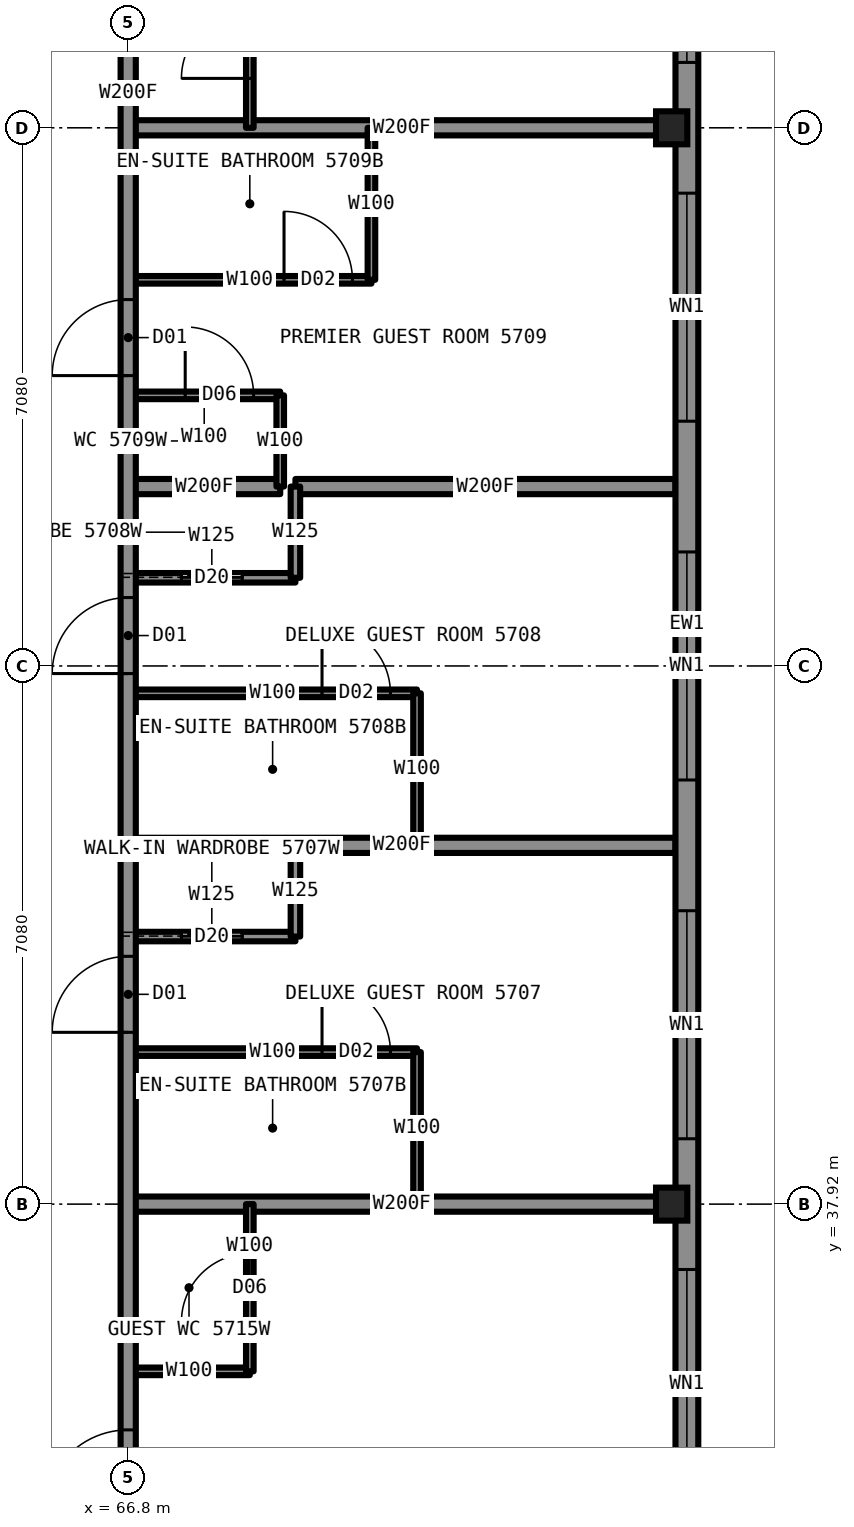
"""IFC4 building model, lengths in metres.
Left out: names, types, materials, properties, quantities, classifications, styles, units other than length and angle.
Written with IfcOpenShell. Run it as: python <this file> out.ifc"""

import sys

from ifc_helpers import new_model, si_unit, direction, frame, frame_2d, origin, origin_2d, place, context, subcontext, project, spatial, rectangle, i_section, extrude, element, fill, save


model = new_model("IFC4")
c1 = context("Model", 3, precision=1e-05, world=origin(), true_north=direction((0.0, 1.0)))
c2 = subcontext(c1, "Body", "Model", "MODEL_VIEW")
j1 = project(units=[si_unit("LENGTHUNIT", "METRE"), si_unit("PLANEANGLEUNIT", "RADIAN")], contexts=[c1])
p1 = place(None, origin())
s1 = spatial("IfcSite", under=j1, at=p1, CompositionType="ELEMENT")
p2 = place(p1, origin())
s2 = spatial("IfcBuilding", under=s1, at=p2, CompositionType="ELEMENT")
p3 = place(p2, frame((0.0, 0.0, 203.8)))
s3 = spatial("IfcBuildingStorey", under=s2, at=p3, CompositionType="ELEMENT", Elevation=203.8)
for number, where, z_axis, x_axis in (
    (1, (73.95, 37.92, 0.0), (0.0, 0.0, 1.0), (1.0, 0.0, 0.0)),
    (2, (73.95, 52.08, 0.0), (0.0, 0.0, 1.0), (1.0, 0.0, 0.0)),
):
    element("IfcColumn", number, at=place(p3, frame(where, z_axis=z_axis, x_axis=x_axis)), inside=s3, PredefinedType="COLUMN", context=c2, shape_type="SweptSolid", body=[
        extrude(i_section(OverallWidth=0.411, OverallDepth=0.434, WebThickness=0.036, FlangeThickness=0.057, at=origin_2d()), origin(), (0.0, 0.0, 1.0), 3.5),
    ])
p4 = place(p3, frame((66.8, 44.64, 0.0), z_axis=(0.0, 0.0, 1.0), x_axis=(1.0, 0.0, 0.0)))
e3 = element("IfcWall", 3, at=p4, inside=s3, PredefinedType="PARTITIONING", context=c2, shape_type="SweptSolid", body=[
    extrude(rectangle(XDim=3.8, YDim=0.1, at=frame_2d((1.9, 0.0))), origin(), (0.0, 0.0, 1.0), 3.33),
])
p5 = place(p4, frame((2.55, 0.0, 0.0)))
e4 = element("IfcOpeningElement", 4, at=p5, cuts=e3, PredefinedType="OPENING", context=c2, shape_type="SweptSolid", body=[
    extrude(rectangle(XDim=0.9, YDim=2.1, at=frame_2d((0.45, 1.05))), frame((0.0, 0.06, 0.0), z_axis=(0.0, -1.0, 0.0), x_axis=(1.0, 0.0, 0.0)), (0.0, 0.0, 1.0), 0.12),
])
p6 = place(p3, frame((66.8, 42.64, 0.0), z_axis=(0.0, 0.0, 1.0), x_axis=(1.0, 0.0, 0.0)))
e5 = element("IfcWall", 5, at=p6, inside=s3, PredefinedType="PARTITIONING", context=c2, shape_type="SweptSolid", body=[
    extrude(rectangle(XDim=7.2, YDim=0.2, at=frame_2d((3.6, 0.0))), origin(), (0.0, 0.0, 1.0), 2.73),
])
p7 = place(p3, frame((66.8, 41.44, 0.0), z_axis=(0.0, 0.0, 1.0), x_axis=(1.0, 0.0, 0.0)))
e6 = element("IfcWall", 6, at=p7, inside=s3, PredefinedType="PARTITIONING", context=c2, shape_type="SweptSolid", body=[
    extrude(rectangle(XDim=2.2, YDim=0.125, at=frame_2d((1.1, 0.0))), origin(), (0.0, 0.0, 1.0), 3.33),
])
p8 = place(p7, frame((0.7, 0.0, 0.0)))
e7 = element("IfcOpeningElement", 7, at=p8, cuts=e6, PredefinedType="OPENING", context=c2, shape_type="SweptSolid", body=[
    extrude(rectangle(XDim=0.8, YDim=2.1, at=frame_2d((0.4, 1.05))), frame((0.0, 0.073, 0.0), z_axis=(0.0, -1.0, 0.0), x_axis=(1.0, 0.0, 0.0)), (0.0, 0.0, 1.0), 0.145),
])
p9 = place(p3, frame((66.8, 39.92, 0.0), z_axis=(0.0, 0.0, 1.0), x_axis=(1.0, 0.0, 0.0)))
e8 = element("IfcWall", 8, at=p9, inside=s3, PredefinedType="PARTITIONING", context=c2, shape_type="SweptSolid", body=[
    extrude(rectangle(XDim=3.8, YDim=0.1, at=frame_2d((1.9, 0.0))), origin(), (0.0, 0.0, 1.0), 3.33),
])
p10 = place(p9, frame((2.55, 0.0, 0.0)))
e9 = element("IfcOpeningElement", 9, at=p10, cuts=e8, PredefinedType="OPENING", context=c2, shape_type="SweptSolid", body=[
    extrude(rectangle(XDim=0.9, YDim=2.1, at=frame_2d((0.45, 1.05))), frame((0.0, 0.06, 0.0), z_axis=(0.0, -1.0, 0.0), x_axis=(1.0, 0.0, 0.0)), (0.0, 0.0, 1.0), 0.12),
])
p11 = place(p3, frame((66.8, 37.92, 0.0), z_axis=(0.0, 0.0, 1.0), x_axis=(1.0, 0.0, 0.0)))
e10 = element("IfcWall", 10, at=p11, inside=s3, PredefinedType="PARTITIONING", context=c2, shape_type="SweptSolid", body=[
    extrude(rectangle(XDim=7.2, YDim=0.2, at=frame_2d((3.6, 0.0))), origin(), (0.0, 0.0, 1.0), 2.573),
])
p12 = place(p3, frame((66.8, 35.72, 0.0), z_axis=(0.0, 0.0, 1.0), x_axis=(1.0, 0.0, 0.0)))
e11 = element("IfcWall", 11, at=p12, inside=s3, PredefinedType="PARTITIONING", context=c2, shape_type="SweptSolid", body=[
    extrude(rectangle(XDim=1.6, YDim=0.1, at=frame_2d((0.8, 0.0))), origin(), (0.0, 0.0, 1.0), 3.33),
])
p13 = place(p3, frame((66.8, 46.16, 0.0), z_axis=(0.0, 0.0, 1.0), x_axis=(1.0, 0.0, 0.0)))
e12 = element("IfcWall", 12, at=p13, inside=s3, PredefinedType="PARTITIONING", context=c2, shape_type="SweptSolid", body=[
    extrude(rectangle(XDim=2.2, YDim=0.125, at=frame_2d((1.1, 0.0))), origin(), (0.0, 0.0, 1.0), 3.33),
])
p14 = place(p13, frame((0.7, 0.0, 0.0)))
e13 = element("IfcOpeningElement", 13, at=p14, cuts=e12, PredefinedType="OPENING", context=c2, shape_type="SweptSolid", body=[
    extrude(rectangle(XDim=0.8, YDim=2.1, at=frame_2d((0.4, 1.05))), frame((0.0, 0.073, 0.0), z_axis=(0.0, -1.0, 0.0), x_axis=(1.0, 0.0, 0.0)), (0.0, 0.0, 1.0), 0.145),
])
p15 = place(p3, frame((66.8, 47.36, 0.0), z_axis=(0.0, 0.0, 1.0), x_axis=(1.0, 0.0, 0.0)))
e14 = element("IfcWall", 14, at=p15, inside=s3, PredefinedType="PARTITIONING", context=c2, shape_type="SweptSolid", body=[
    extrude(rectangle(XDim=2.0, YDim=0.2, at=frame_2d((1.0, 0.0))), origin(), (0.0, 0.0, 1.0), 2.73),
])
p16 = place(p3, frame((69.0, 47.36, 0.0), z_axis=(0.0, 0.0, 1.0), x_axis=(1.0, 0.0, 0.0)))
e15 = element("IfcWall", 15, at=p16, inside=s3, PredefinedType="PARTITIONING", context=c2, shape_type="SweptSolid", body=[
    extrude(rectangle(XDim=5.0, YDim=0.2, at=frame_2d((2.5, 0.0))), origin(), (0.0, 0.0, 1.0), 2.73),
])
p17 = place(p3, frame((66.8, 48.56, 0.0), z_axis=(0.0, 0.0, 1.0), x_axis=(1.0, 0.0, 0.0)))
e16 = element("IfcWall", 16, at=p17, inside=s3, PredefinedType="PARTITIONING", context=c2, shape_type="SweptSolid", body=[
    extrude(rectangle(XDim=2.0, YDim=0.1, at=frame_2d((1.0, 0.0))), origin(), (0.0, 0.0, 1.0), 3.33),
])
p18 = place(p17, frame((0.75, 0.0, 0.0)))
e17 = element("IfcOpeningElement", 17, at=p18, cuts=e16, PredefinedType="OPENING", context=c2, shape_type="SweptSolid", body=[
    extrude(rectangle(XDim=0.9, YDim=2.1, at=frame_2d((0.45, 1.05))), frame((0.0, 0.06, 0.0), z_axis=(0.0, -1.0, 0.0), x_axis=(1.0, 0.0, 0.0)), (0.0, 0.0, 1.0), 0.12),
])
p19 = place(p3, frame((66.8, 50.08, 0.0), z_axis=(0.0, 0.0, 1.0), x_axis=(1.0, 0.0, 0.0)))
e18 = element("IfcWall", 18, at=p19, inside=s3, PredefinedType="PARTITIONING", context=c2, shape_type="SweptSolid", body=[
    extrude(rectangle(XDim=3.2, YDim=0.1, at=frame_2d((1.6, 0.0))), origin(), (0.0, 0.0, 1.0), 3.33),
])
p20 = place(p19, frame((2.05, 0.0, 0.0)))
e19 = element("IfcOpeningElement", 19, at=p20, cuts=e18, PredefinedType="OPENING", context=c2, shape_type="SweptSolid", body=[
    extrude(rectangle(XDim=0.9, YDim=2.1, at=frame_2d((0.45, 1.05))), frame((0.0, 0.06, 0.0), z_axis=(0.0, -1.0, 0.0), x_axis=(1.0, 0.0, 0.0)), (0.0, 0.0, 1.0), 0.12),
])
p21 = place(p3, frame((66.8, 52.08, 0.0), z_axis=(0.0, 0.0, 1.0), x_axis=(1.0, 0.0, 0.0)))
e20 = element("IfcWall", 20, at=p21, inside=s3, PredefinedType="PARTITIONING", context=c2, shape_type="SweptSolid", body=[
    extrude(rectangle(XDim=7.2, YDim=0.2, at=frame_2d((3.6, 0.0))), origin(), (0.0, 0.0, 1.0), 2.573),
])
p22 = place(p3, frame((66.8, 33.2, 0.0), z_axis=(0.0, 0.0, 1.0), x_axis=(0.0, 1.0, 0.0)))
e21 = element("IfcWall", 21, at=p22, inside=s3, PredefinedType="PARTITIONING", context=c2, shape_type="SweptSolid", body=[
    extrude(rectangle(XDim=23.58, YDim=0.2, at=frame_2d((11.79, 0.0))), origin(), (0.0, 0.0, 1.0), 3.33),
])
p23 = place(p22, frame((6.98, 0.0, 0.0)))
e22 = element("IfcOpeningElement", 22, at=p23, cuts=e21, PredefinedType="OPENING", context=c2, shape_type="SweptSolid", body=[
    extrude(rectangle(XDim=1.0, YDim=2.2, at=frame_2d((0.5, 1.1))), frame((0.0, 0.11, 0.0), z_axis=(0.0, -1.0, 0.0), x_axis=(1.0, 0.0, 0.0)), (0.0, 0.0, 1.0), 0.22),
])
p24 = place(p22, frame((11.7, 0.0, 0.0)))
e23 = element("IfcOpeningElement", 23, at=p24, cuts=e21, PredefinedType="OPENING", context=c2, shape_type="SweptSolid", body=[
    extrude(rectangle(XDim=1.0, YDim=2.2, at=frame_2d((0.5, 1.1))), frame((0.0, 0.11, 0.0), z_axis=(0.0, -1.0, 0.0), x_axis=(1.0, 0.0, 0.0)), (0.0, 0.0, 1.0), 0.22),
])
p25 = place(p22, frame((15.62, 0.0, 0.0)))
e24 = element("IfcOpeningElement", 24, at=p25, cuts=e21, PredefinedType="OPENING", context=c2, shape_type="SweptSolid", body=[
    extrude(rectangle(XDim=1.0, YDim=2.2, at=frame_2d((0.5, 1.1))), frame((0.0, 0.11, 0.0), z_axis=(0.0, -1.0, 0.0), x_axis=(1.0, 0.0, 0.0)), (0.0, 0.0, 1.0), 0.22),
])
p26 = place(p22, frame((22.05, 0.0, 0.0)))
e25 = element("IfcOpeningElement", 25, at=p26, cuts=e21, PredefinedType="OPENING", context=c2, shape_type="SweptSolid", body=[
    extrude(rectangle(XDim=1.1, YDim=2.2, at=frame_2d((0.55, 1.1))), frame((0.0, 0.11, 0.0), z_axis=(0.0, -1.0, 0.0), x_axis=(1.0, 0.0, 0.0)), (0.0, 0.0, 1.0), 0.22),
])
p27 = place(p22, frame((0.65, 0.0, 0.0)))
e26 = element("IfcOpeningElement", 26, at=p27, cuts=e21, PredefinedType="OPENING", context=c2, shape_type="SweptSolid", body=[
    extrude(rectangle(XDim=1.1, YDim=2.2, at=frame_2d((0.55, 1.1))), frame((0.0, 0.11, 0.0), z_axis=(0.0, -1.0, 0.0), x_axis=(1.0, 0.0, 0.0)), (0.0, 0.0, 1.0), 0.22),
])
p28 = place(p3, frame((68.4, 35.72, 0.0), z_axis=(0.0, 0.0, 1.0), x_axis=(0.0, 1.0, 0.0)))
e27 = element("IfcWall", 27, at=p28, inside=s3, PredefinedType="PARTITIONING", context=c2, shape_type="SweptSolid", body=[
    extrude(rectangle(XDim=2.2, YDim=0.1, at=frame_2d((1.1, 0.0))), origin(), (0.0, 0.0, 1.0), 3.33),
])
p29 = place(p28, frame((0.65, 0.0, 0.0)))
e28 = element("IfcOpeningElement", 28, at=p29, cuts=e27, PredefinedType="OPENING", context=c2, shape_type="SweptSolid", body=[
    extrude(rectangle(XDim=0.9, YDim=2.1, at=frame_2d((0.45, 1.05))), frame((0.0, 0.06, 0.0), z_axis=(0.0, -1.0, 0.0), x_axis=(1.0, 0.0, 0.0)), (0.0, 0.0, 1.0), 0.12),
])
p30 = place(p3, frame((68.4, 52.08, 0.0), z_axis=(0.0, 0.0, 1.0), x_axis=(0.0, 1.0, 0.0)))
e29 = element("IfcWall", 29, at=p30, inside=s3, PredefinedType="PARTITIONING", context=c2, shape_type="SweptSolid", body=[
    extrude(rectangle(XDim=2.2, YDim=0.1, at=frame_2d((1.1, 0.0))), origin(), (0.0, 0.0, 1.0), 3.33),
])
p31 = place(p30, frame((0.65, 0.0, 0.0)))
e30 = element("IfcOpeningElement", 30, at=p31, cuts=e29, PredefinedType="OPENING", context=c2, shape_type="SweptSolid", body=[
    extrude(rectangle(XDim=0.9, YDim=2.1, at=frame_2d((0.45, 1.05))), frame((0.0, 0.06, 0.0), z_axis=(0.0, -1.0, 0.0), x_axis=(1.0, 0.0, 0.0)), (0.0, 0.0, 1.0), 0.12),
])
p32 = place(p3, frame((68.8, 47.36, 0.0), z_axis=(0.0, 0.0, 1.0), x_axis=(0.0, 1.0, 0.0)))
e31 = element("IfcWall", 31, at=p32, inside=s3, PredefinedType="PARTITIONING", context=c2, shape_type="SweptSolid", body=[
    extrude(rectangle(XDim=1.2, YDim=0.1, at=frame_2d((0.6, 0.0))), origin(), (0.0, 0.0, 1.0), 3.33),
])
p33 = place(p3, frame((69.0, 41.44, 0.0), z_axis=(0.0, 0.0, 1.0), x_axis=(0.0, 1.0, 0.0)))
e32 = element("IfcWall", 32, at=p33, inside=s3, PredefinedType="PARTITIONING", context=c2, shape_type="SweptSolid", body=[
    extrude(rectangle(XDim=1.2, YDim=0.125, at=frame_2d((0.6, 0.0))), origin(), (0.0, 0.0, 1.0), 3.33),
])
p34 = place(p3, frame((69.0, 46.16, 0.0), z_axis=(0.0, 0.0, 1.0), x_axis=(0.0, 1.0, 0.0)))
e33 = element("IfcWall", 33, at=p34, inside=s3, PredefinedType="PARTITIONING", context=c2, shape_type="SweptSolid", body=[
    extrude(rectangle(XDim=1.2, YDim=0.125, at=frame_2d((0.6, 0.0))), origin(), (0.0, 0.0, 1.0), 3.33),
])
for number, where, z_axis, x_axis in (
    (34, (70.0, 50.08, 0.0), (0.0, 0.0, 1.0), (0.0, 1.0, 0.0)),
    (35, (70.6, 37.92, 0.0), (0.0, 0.0, 1.0), (0.0, 1.0, 0.0)),
    (36, (70.6, 42.64, 0.0), (0.0, 0.0, 1.0), (0.0, 1.0, 0.0)),
):
    element("IfcWall", number, at=place(p3, frame(where, z_axis=z_axis, x_axis=x_axis)), inside=s3, PredefinedType="PARTITIONING", context=c2, shape_type="SweptSolid", body=[
        extrude(rectangle(XDim=2.0, YDim=0.1, at=frame_2d((1.0, 0.0))), origin(), (0.0, 0.0, 1.0), 3.33),
    ])
p35 = place(p3, frame((74.15, 31.2, 0.0), z_axis=(0.0, 0.0, 1.0), x_axis=(0.0, 1.0, 0.0)))
e37 = element("IfcWall", 37, at=p35, inside=s3, PredefinedType="SOLIDWALL", context=c2, shape_type="SweptSolid", body=[
    extrude(rectangle(XDim=27.6, YDim=0.3, at=frame_2d((13.8, 0.0))), origin(), (0.0, 0.0, 1.0), 2.83),
])
p36 = place(p35, frame((2.86, 0.0, 0.3)))
e38 = element("IfcOpeningElement", 38, at=p36, cuts=e37, PredefinedType="OPENING", context=c2, shape_type="SweptSolid", body=[
    extrude(rectangle(XDim=0.7, YDim=1.2, at=frame_2d((0.35, 0.6))), frame((0.0, 0.16, 0.0), z_axis=(0.0, -1.0, 0.0), x_axis=(1.0, 0.0, 0.0)), (0.0, 0.0, 1.0), 0.32),
])
p37 = place(p35, frame((7.58, 0.0, 0.3)))
e39 = element("IfcOpeningElement", 39, at=p37, cuts=e37, PredefinedType="OPENING", context=c2, shape_type="SweptSolid", body=[
    extrude(rectangle(XDim=3.0, YDim=2.0, at=frame_2d((1.5, 1.0))), frame((0.0, 0.16, 0.0), z_axis=(0.0, -1.0, 0.0), x_axis=(1.0, 0.0, 0.0)), (0.0, 0.0, 1.0), 0.32),
])
p38 = place(p35, frame((12.3, 0.0, 0.3)))
e40 = element("IfcOpeningElement", 40, at=p38, cuts=e37, PredefinedType="OPENING", context=c2, shape_type="SweptSolid", body=[
    extrude(rectangle(XDim=3.0, YDim=2.0, at=frame_2d((1.5, 1.0))), frame((0.0, 0.16, 0.0), z_axis=(0.0, -1.0, 0.0), x_axis=(1.0, 0.0, 0.0)), (0.0, 0.0, 1.0), 0.32),
])
p39 = place(p35, frame((17.02, 0.0, 0.3)))
e41 = element("IfcOpeningElement", 41, at=p39, cuts=e37, PredefinedType="OPENING", context=c2, shape_type="SweptSolid", body=[
    extrude(rectangle(XDim=3.0, YDim=2.0, at=frame_2d((1.5, 1.0))), frame((0.0, 0.16, 0.0), z_axis=(0.0, -1.0, 0.0), x_axis=(1.0, 0.0, 0.0)), (0.0, 0.0, 1.0), 0.32),
])
p40 = place(p35, frame((23.99, 0.0, 0.3)))
e42 = element("IfcOpeningElement", 42, at=p40, cuts=e37, PredefinedType="OPENING", context=c2, shape_type="SweptSolid", body=[
    extrude(rectangle(XDim=0.7, YDim=1.2, at=frame_2d((0.35, 0.6))), frame((0.0, 0.16, 0.0), z_axis=(0.0, -1.0, 0.0), x_axis=(1.0, 0.0, 0.0)), (0.0, 0.0, 1.0), 0.32),
])
p41 = place(p23, origin())
e43 = element("IfcDoor", 43, at=p41, inside=s3, OperationType="SINGLE_SWING_LEFT", PredefinedType="DOOR", context=c2, shape_type="SweptSolid", body=[
    extrude(rectangle(XDim=1.0, YDim=2.2, at=frame_2d((0.5, 1.1))), frame((0.0, 0.025, 0.0), z_axis=(0.0, -1.0, 0.0), x_axis=(1.0, 0.0, 0.0)), (0.0, 0.0, 1.0), 0.05),
])
fill(e22, e43)
p42 = place(p10, origin())
e44 = element("IfcDoor", 44, at=p42, inside=s3, OperationType="SINGLE_SWING_RIGHT", PredefinedType="DOOR", context=c2, shape_type="SweptSolid", body=[
    extrude(rectangle(XDim=0.9, YDim=2.1, at=frame_2d((0.45, 1.05))), frame((0.0, 0.025, 0.0), z_axis=(0.0, -1.0, 0.0), x_axis=(1.0, 0.0, 0.0)), (0.0, 0.0, 1.0), 0.05),
])
fill(e9, e44)
p43 = place(p8, origin())
e45 = element("IfcDoor", 45, at=p43, inside=s3, OperationType="SLIDING_TO_LEFT", PredefinedType="DOOR", context=c2, shape_type="SweptSolid", body=[
    extrude(rectangle(XDim=0.8, YDim=2.1, at=frame_2d((0.4, 1.05))), frame((0.0, 0.025, 0.0), z_axis=(0.0, -1.0, 0.0), x_axis=(1.0, 0.0, 0.0)), (0.0, 0.0, 1.0), 0.05),
])
fill(e7, e45)
p44 = place(p24, origin())
e46 = element("IfcDoor", 46, at=p44, inside=s3, OperationType="SINGLE_SWING_LEFT", PredefinedType="DOOR", context=c2, shape_type="SweptSolid", body=[
    extrude(rectangle(XDim=1.0, YDim=2.2, at=frame_2d((0.5, 1.1))), frame((0.0, 0.025, 0.0), z_axis=(0.0, -1.0, 0.0), x_axis=(1.0, 0.0, 0.0)), (0.0, 0.0, 1.0), 0.05),
])
fill(e23, e46)
p45 = place(p5, origin())
e47 = element("IfcDoor", 47, at=p45, inside=s3, OperationType="SINGLE_SWING_RIGHT", PredefinedType="DOOR", context=c2, shape_type="SweptSolid", body=[
    extrude(rectangle(XDim=0.9, YDim=2.1, at=frame_2d((0.45, 1.05))), frame((0.0, 0.025, 0.0), z_axis=(0.0, -1.0, 0.0), x_axis=(1.0, 0.0, 0.0)), (0.0, 0.0, 1.0), 0.05),
])
fill(e4, e47)
p46 = place(p14, origin())
e48 = element("IfcDoor", 48, at=p46, inside=s3, OperationType="SLIDING_TO_LEFT", PredefinedType="DOOR", context=c2, shape_type="SweptSolid", body=[
    extrude(rectangle(XDim=0.8, YDim=2.1, at=frame_2d((0.4, 1.05))), frame((0.0, 0.025, 0.0), z_axis=(0.0, -1.0, 0.0), x_axis=(1.0, 0.0, 0.0)), (0.0, 0.0, 1.0), 0.05),
])
fill(e13, e48)
p47 = place(p25, origin())
e49 = element("IfcDoor", 49, at=p47, inside=s3, OperationType="SINGLE_SWING_LEFT", PredefinedType="DOOR", context=c2, shape_type="SweptSolid", body=[
    extrude(rectangle(XDim=1.0, YDim=2.2, at=frame_2d((0.5, 1.1))), frame((0.0, 0.025, 0.0), z_axis=(0.0, -1.0, 0.0), x_axis=(1.0, 0.0, 0.0)), (0.0, 0.0, 1.0), 0.05),
])
fill(e24, e49)
p48 = place(p20, origin())
e50 = element("IfcDoor", 50, at=p48, inside=s3, OperationType="SINGLE_SWING_RIGHT", PredefinedType="DOOR", context=c2, shape_type="SweptSolid", body=[
    extrude(rectangle(XDim=0.9, YDim=2.1, at=frame_2d((0.45, 1.05))), frame((0.0, 0.025, 0.0), z_axis=(0.0, -1.0, 0.0), x_axis=(1.0, 0.0, 0.0)), (0.0, 0.0, 1.0), 0.05),
])
fill(e19, e50)
p49 = place(p18, origin())
e51 = element("IfcDoor", 51, at=p49, inside=s3, OperationType="SINGLE_SWING_LEFT", PredefinedType="DOOR", context=c2, shape_type="SweptSolid", body=[
    extrude(rectangle(XDim=0.9, YDim=2.1, at=frame_2d((0.45, 1.05))), frame((0.0, 0.025, 0.0), z_axis=(0.0, -1.0, 0.0), x_axis=(1.0, 0.0, 0.0)), (0.0, 0.0, 1.0), 0.05),
])
fill(e17, e51)
p50 = place(p31, origin())
e52 = element("IfcDoor", 52, at=p50, inside=s3, OperationType="SINGLE_SWING_LEFT", PredefinedType="DOOR", context=c2, shape_type="SweptSolid", body=[
    extrude(rectangle(XDim=0.9, YDim=2.1, at=frame_2d((0.45, 1.05))), frame((0.0, 0.025, 0.0), z_axis=(0.0, -1.0, 0.0), x_axis=(1.0, 0.0, 0.0)), (0.0, 0.0, 1.0), 0.05),
])
fill(e30, e52)
p51 = place(p27, origin())
e53 = element("IfcDoor", 53, at=p51, inside=s3, OperationType="SINGLE_SWING_LEFT", PredefinedType="DOOR", context=c2, shape_type="SweptSolid", body=[
    extrude(rectangle(XDim=1.1, YDim=2.2, at=frame_2d((0.55, 1.1))), frame((0.0, 0.025, 0.0), z_axis=(0.0, -1.0, 0.0), x_axis=(1.0, 0.0, 0.0)), (0.0, 0.0, 1.0), 0.05),
])
fill(e26, e53)
p52 = place(p29, origin())
e54 = element("IfcDoor", 54, at=p52, inside=s3, OperationType="SINGLE_SWING_LEFT", PredefinedType="DOOR", context=c2, shape_type="SweptSolid", body=[
    extrude(rectangle(XDim=0.9, YDim=2.1, at=frame_2d((0.45, 1.05))), frame((0.0, 0.025, 0.0), z_axis=(0.0, -1.0, 0.0), x_axis=(1.0, 0.0, 0.0)), (0.0, 0.0, 1.0), 0.05),
])
fill(e28, e54)
p53 = place(p36, origin())
e55 = element("IfcWindow", 55, at=p53, inside=s3, PartitioningType="SINGLE_PANEL", PredefinedType="WINDOW", context=c2, shape_type="SweptSolid", body=[
    extrude(rectangle(XDim=0.7, YDim=1.2, at=frame_2d((0.35, 0.6))), frame((0.0, 0.13, 0.0), z_axis=(0.0, -1.0, 0.0), x_axis=(1.0, 0.0, 0.0)), (0.0, 0.0, 1.0), 0.06),
])
fill(e38, e55)
p54 = place(p37, origin())
e56 = element("IfcWindow", 56, at=p54, inside=s3, PartitioningType="SINGLE_PANEL", PredefinedType="WINDOW", context=c2, shape_type="SweptSolid", body=[
    extrude(rectangle(XDim=3.0, YDim=2.0, at=frame_2d((1.5, 1.0))), frame((0.0, 0.13, 0.0), z_axis=(0.0, -1.0, 0.0), x_axis=(1.0, 0.0, 0.0)), (0.0, 0.0, 1.0), 0.06),
])
fill(e39, e56)
p55 = place(p38, origin())
e57 = element("IfcWindow", 57, at=p55, inside=s3, PartitioningType="SINGLE_PANEL", PredefinedType="WINDOW", context=c2, shape_type="SweptSolid", body=[
    extrude(rectangle(XDim=3.0, YDim=2.0, at=frame_2d((1.5, 1.0))), frame((0.0, 0.13, 0.0), z_axis=(0.0, -1.0, 0.0), x_axis=(1.0, 0.0, 0.0)), (0.0, 0.0, 1.0), 0.06),
])
fill(e40, e57)
p56 = place(p39, origin())
e58 = element("IfcWindow", 58, at=p56, inside=s3, PartitioningType="SINGLE_PANEL", PredefinedType="WINDOW", context=c2, shape_type="SweptSolid", body=[
    extrude(rectangle(XDim=3.0, YDim=2.0, at=frame_2d((1.5, 1.0))), frame((0.0, 0.13, 0.0), z_axis=(0.0, -1.0, 0.0), x_axis=(1.0, 0.0, 0.0)), (0.0, 0.0, 1.0), 0.06),
])
fill(e41, e58)
save(model, sys.argv[1])
